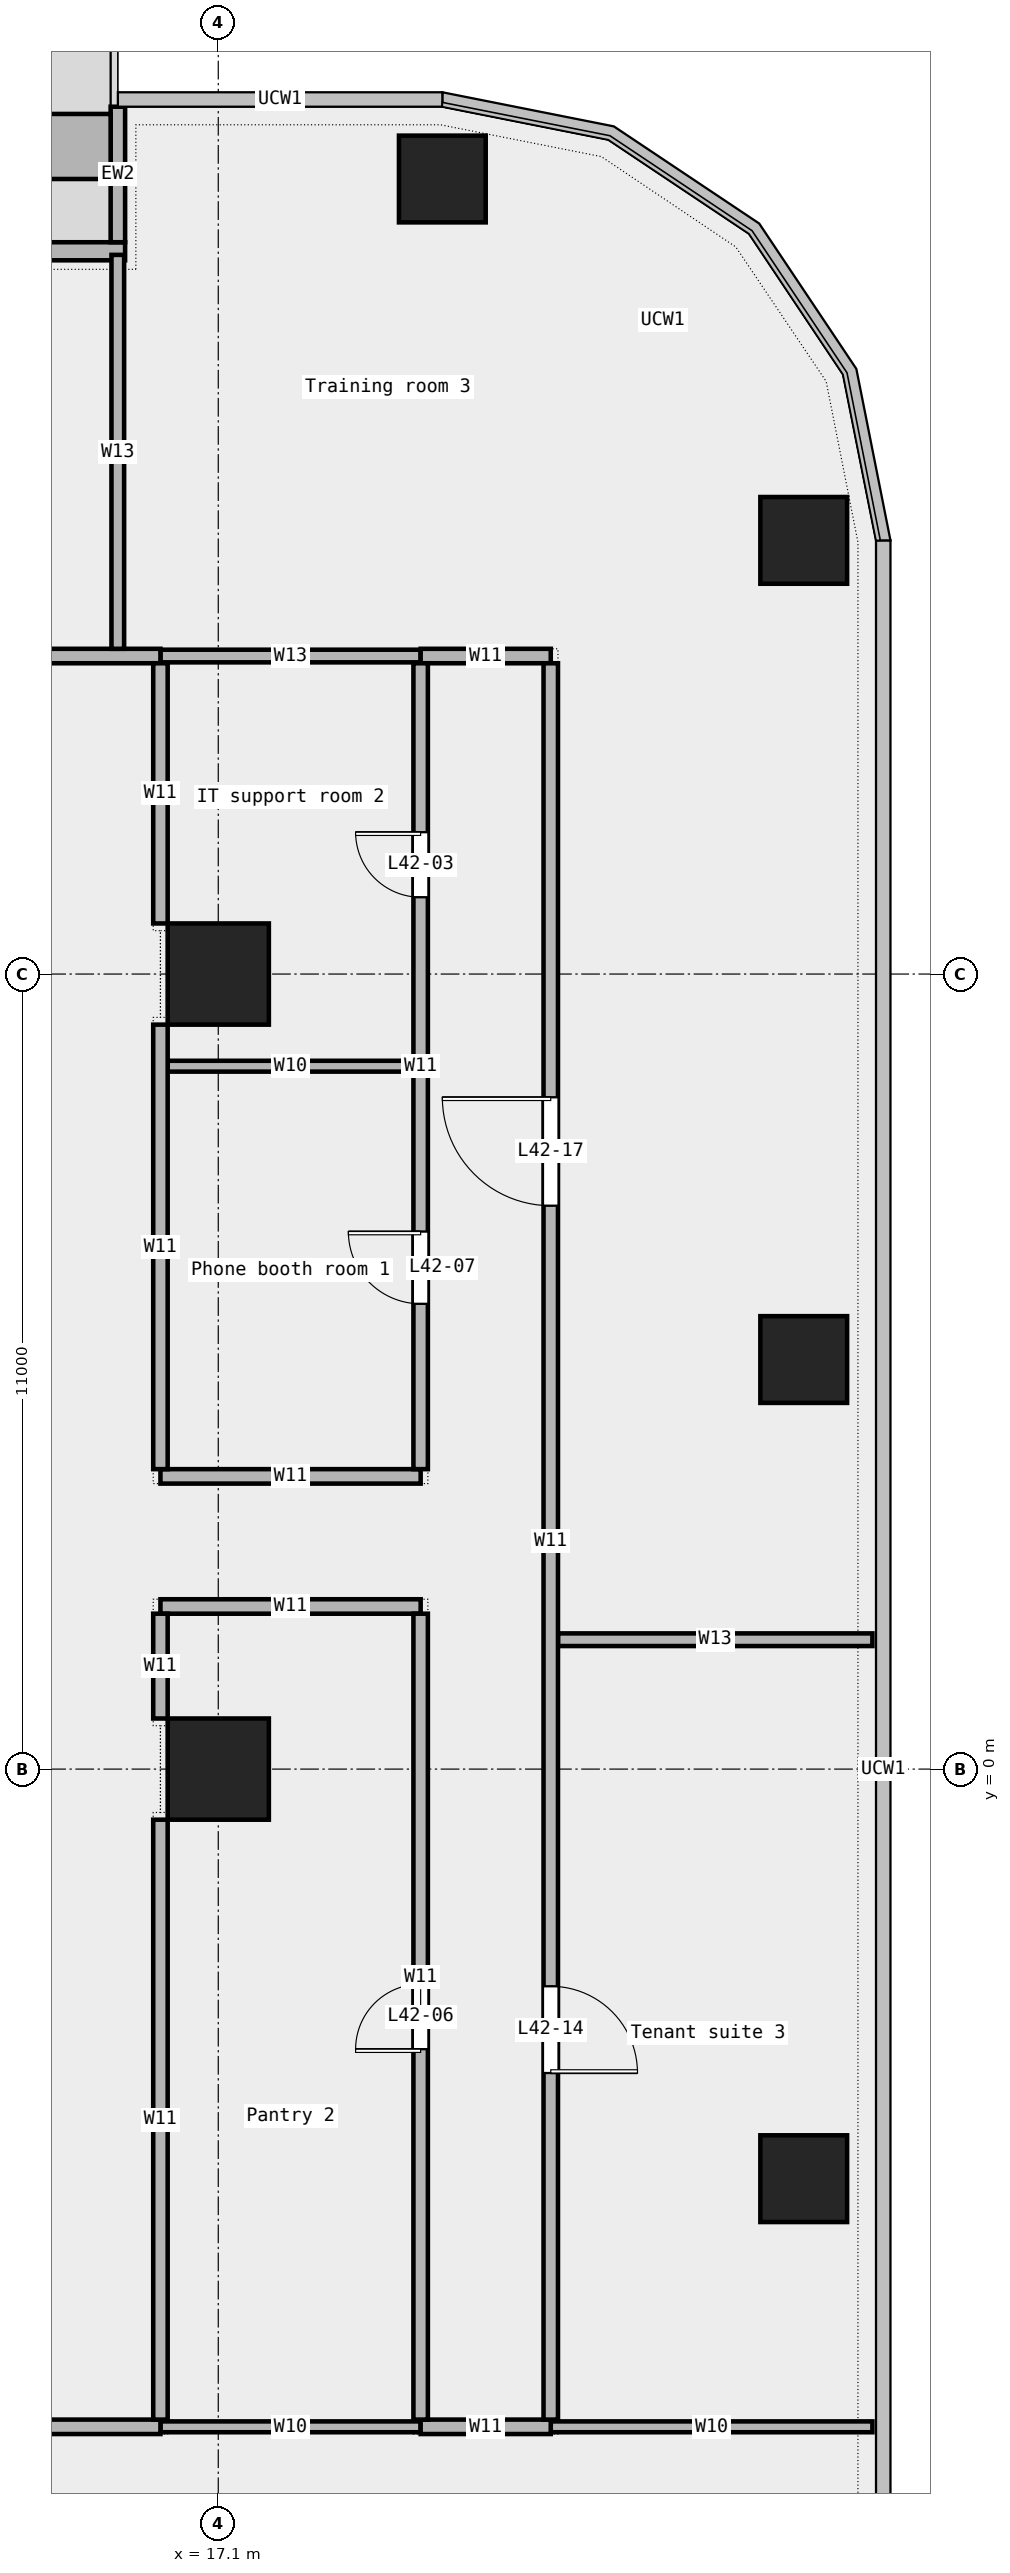
"""IFC4 building model, lengths in metres.
Left out: names, types, materials, properties, quantities, classifications, styles, units other than length and angle.
Written with IfcOpenShell. Run it as: python <this file> out.ifc"""

import sys

from ifc_helpers import new_model, si_unit, direction, frame, frame_2d, origin, origin_2d, place, context, subcontext, project, spatial, rectangle, extrude, element, fill, save


model = new_model("IFC4")
c1 = context("Model", 3, precision=1e-05, world=origin(), true_north=direction((0.0, 1.0)))
c2 = subcontext(c1, "Body", "Model", "MODEL_VIEW")
j1 = project(units=[si_unit("LENGTHUNIT", "METRE"), si_unit("PLANEANGLEUNIT", "RADIAN")], contexts=[c1])
p1 = place(None, origin())
s1 = spatial("IfcSite", under=j1, at=p1, CompositionType="ELEMENT")
p2 = place(p1, origin())
s2 = spatial("IfcBuilding", under=s1, at=p2, CompositionType="ELEMENT")
p3 = place(p2, frame((0.0, 0.0, 201.0)))
s3 = spatial("IfcBuildingStorey", under=s2, at=p3, CompositionType="ELEMENT", Elevation=201.0)
for number, where, z_axis, x_axis in (
    (1, (25.2, -5.667, 0.0), (0.0, 0.0, 1.0), (1.0, 0.0, 0.0)),
    (2, (25.2, 5.667, 0.0), (0.0, 0.0, 1.0), (1.0, 0.0, 0.0)),
    (3, (25.2, 17.0, 0.0), (0.0, 0.0, 1.0), (1.0, 0.0, 0.0)),
    (4, (20.2, 22.0, 0.0), (0.0, 0.0, 1.0), (1.0, 0.0, 0.0)),
):
    element("IfcColumn", number, at=place(p3, frame(where, z_axis=z_axis, x_axis=x_axis)), inside=s3, PredefinedType="COLUMN", context=c2, shape_type="SweptSolid", body=[
        extrude(rectangle(XDim=1.2, YDim=1.2, at=origin_2d()), origin(), (0.0, 0.0, 1.0), 3.4),
    ])
for number, where, z_axis, x_axis in (
    (5, (17.1, 0.0, 0.0), (0.0, 0.0, 1.0), (1.0, 0.0, 0.0)),
    (6, (17.1, 11.0, 0.0), (0.0, 0.0, 1.0), (1.0, 0.0, 0.0)),
):
    element("IfcColumn", number, at=place(p3, frame(where, z_axis=z_axis, x_axis=x_axis)), inside=s3, PredefinedType="COLUMN", context=c2, shape_type="SweptSolid", body=[
        extrude(rectangle(XDim=1.4, YDim=1.4, at=origin_2d()), origin(), (0.0, 0.0, 1.0), 3.4),
    ])
p4 = place(p3, frame((15.811, 21.0, 0.0), z_axis=(0.0, 0.0, 1.0), x_axis=(-1.0, 0.0, 0.0)))
e7 = element("IfcWall", 7, at=p4, inside=s3, PredefinedType="STANDARD", context=c2, shape_type="SweptSolid", body=[
    extrude(rectangle(XDim=13.667, YDim=0.25, at=frame_2d((6.833, 0.0))), origin(), (0.0, 0.0, 1.0), 3.4),
])
p5 = place(p4, frame((1.75, 0.0, 0.45)))
e8 = element("IfcOpeningElement", 8, at=p5, cuts=e7, PredefinedType="OPENING", context=c2, shape_type="SweptSolid", body=[
    extrude(rectangle(XDim=1.5, YDim=2.4, at=frame_2d((0.75, 1.2))), frame((0.0, 0.137, 0.0), z_axis=(0.0, -1.0, 0.0), x_axis=(1.0, 0.0, 0.0)), (0.0, 0.0, 1.0), 0.274),
])
p6 = place(p4, frame((6.75, 0.0, 0.0)))
e9 = element("IfcOpeningElement", 9, at=p6, cuts=e7, PredefinedType="OPENING", context=c2, shape_type="SweptSolid", body=[
    extrude(rectangle(XDim=1.8, YDim=2.4, at=frame_2d((0.9, 1.2))), frame((0.0, 0.137, 0.0), z_axis=(0.0, -1.0, 0.0), x_axis=(1.0, 0.0, 0.0)), (0.0, 0.0, 1.0), 0.274),
])
p7 = place(p4, frame((10.5, 0.0, 0.45)))
e10 = element("IfcOpeningElement", 10, at=p7, cuts=e7, PredefinedType="OPENING", context=c2, shape_type="SweptSolid", body=[
    extrude(rectangle(XDim=1.5, YDim=2.4, at=frame_2d((0.75, 1.2))), frame((0.0, 0.137, 0.0), z_axis=(0.0, -1.0, 0.0), x_axis=(1.0, 0.0, 0.0)), (0.0, 0.0, 1.0), 0.274),
])
p8 = place(p3, frame((15.711, 23.0, 0.0), z_axis=(0.0, 0.0, 1.0), x_axis=(0.0, -1.0, 0.0)))
e11 = element("IfcWall", 11, at=p8, inside=s3, PredefinedType="STANDARD", context=c2, shape_type="SweptSolid", body=[
    extrude(rectangle(XDim=1.875, YDim=0.2, at=frame_2d((0.938, 0.0))), origin(), (0.0, 0.0, 1.0), 3.4),
])
p9 = place(p3, frame((15.611, 22.45, 0.0), z_axis=(0.0, 0.0, 1.0), x_axis=(-1.0, 0.0, 0.0)))
e12 = element("IfcWall", 12, at=p9, inside=s3, PredefinedType="STANDARD", context=c2, shape_type="SweptSolid", body=[
    extrude(rectangle(XDim=3.6, YDim=0.9, at=frame_2d((1.8, 0.0))), origin(), (0.0, 0.0, 1.0), 0.7),
])
p10 = place(p3, frame((16.3, -9.1, 0.0), z_axis=(0.0, 0.0, 1.0), x_axis=(1.0, 0.0, 0.0)))
e13 = element("IfcWall", 13, at=p10, inside=s3, PredefinedType="PARTITIONING", context=c2, shape_type="SweptSolid", body=[
    extrude(rectangle(XDim=3.6, YDim=0.15, at=frame_2d((1.8, 0.0))), origin(), (0.0, 0.0, 1.0), 3.4),
])
p11 = place(p3, frame((21.7, -9.1, 0.0), z_axis=(0.0, 0.0, 1.0), x_axis=(1.0, 0.0, 0.0)))
e14 = element("IfcWall", 14, at=p11, inside=s3, PredefinedType="PARTITIONING", context=c2, shape_type="SweptSolid", body=[
    extrude(rectangle(XDim=4.45, YDim=0.15, at=frame_2d((2.225, 0.0))), origin(), (0.0, 0.0, 1.0), 3.4),
])
p12 = place(p3, frame((4.84, -9.1, 0.0), z_axis=(0.0, 0.0, 1.0), x_axis=(1.0, 0.0, 0.0)))
e15 = element("IfcWall", 15, at=p12, inside=s3, PredefinedType="PARTITIONING", context=c2, shape_type="SweptSolid", body=[
    extrude(rectangle(XDim=11.46, YDim=0.2, at=frame_2d((5.73, 0.0))), origin(), (0.0, 0.0, 1.0), 3.4),
])
p13 = place(p3, frame((19.9, -9.1, 0.0), z_axis=(0.0, 0.0, 1.0), x_axis=(1.0, 0.0, 0.0)))
e16 = element("IfcWall", 16, at=p13, inside=s3, PredefinedType="PARTITIONING", context=c2, shape_type="SweptSolid", body=[
    extrude(rectangle(XDim=1.8, YDim=0.2, at=frame_2d((0.9, 0.0))), origin(), (0.0, 0.0, 1.0), 3.4),
])
p14 = place(p3, frame((21.8, 1.79, 0.0), z_axis=(0.0, 0.0, 1.0), x_axis=(1.0, 0.0, 0.0)))
e17 = element("IfcWall", 17, at=p14, inside=s3, PredefinedType="PARTITIONING", context=c2, shape_type="SweptSolid", body=[
    extrude(rectangle(XDim=4.35, YDim=0.175, at=frame_2d((2.175, 0.0))), origin(), (0.0, 0.0, 1.0), 3.4),
])
for number, where, z_axis, x_axis in (
    (18, (16.3, 2.25, 0.0), (0.0, 0.0, 1.0), (1.0, 0.0, 0.0)),
    (19, (16.3, 4.05, 0.0), (0.0, 0.0, 1.0), (1.0, 0.0, 0.0)),
):
    element("IfcWall", number, at=place(p3, frame(where, z_axis=z_axis, x_axis=x_axis)), inside=s3, PredefinedType="PARTITIONING", context=c2, shape_type="SweptSolid", body=[
        extrude(rectangle(XDim=3.6, YDim=0.2, at=frame_2d((1.8, 0.0))), origin(), (0.0, 0.0, 1.0), 3.4),
    ])
p15 = place(p3, frame((16.4, 9.725, 0.0), z_axis=(0.0, 0.0, 1.0), x_axis=(1.0, 0.0, 0.0)))
e20 = element("IfcWall", 20, at=p15, inside=s3, PredefinedType="PARTITIONING", context=c2, shape_type="SweptSolid", body=[
    extrude(rectangle(XDim=3.4, YDim=0.15, at=frame_2d((1.7, 0.0))), origin(), (0.0, 0.0, 1.0), 3.4),
])
p16 = place(p3, frame((16.3, 15.4, 0.0), z_axis=(0.0, 0.0, 1.0), x_axis=(1.0, 0.0, 0.0)))
e21 = element("IfcWall", 21, at=p16, inside=s3, PredefinedType="PARTITIONING", context=c2, shape_type="SweptSolid", body=[
    extrude(rectangle(XDim=3.6, YDim=0.175, at=frame_2d((1.8, 0.0))), origin(), (0.0, 0.0, 1.0), 3.4),
])
p17 = place(p3, frame((-16.3, 15.4, 0.0), z_axis=(0.0, 0.0, 1.0), x_axis=(1.0, 0.0, 0.0)))
e22 = element("IfcWall", 22, at=p17, inside=s3, PredefinedType="PARTITIONING", context=c2, shape_type="SweptSolid", body=[
    extrude(rectangle(XDim=32.6, YDim=0.2, at=frame_2d((16.3, 0.0))), origin(), (0.0, 0.0, 1.0), 3.4),
])
p18 = place(p17, frame((10.185, 0.0, 0.0)))
e23 = element("IfcOpeningElement", 23, at=p18, cuts=e22, PredefinedType="OPENING", context=c2, shape_type="SweptSolid", body=[
    extrude(rectangle(XDim=1.5, YDim=2.1, at=frame_2d((0.75, 1.05))), frame((0.0, 0.112, 0.0), z_axis=(0.0, -1.0, 0.0), x_axis=(1.0, 0.0, 0.0)), (0.0, 0.0, 1.0), 0.224),
])
p19 = place(p17, frame((1.062, 0.0, 0.0)))
e24 = element("IfcOpeningElement", 24, at=p19, cuts=e22, PredefinedType="OPENING", context=c2, shape_type="SweptSolid", body=[
    extrude(rectangle(XDim=1.2, YDim=2.1, at=frame_2d((0.6, 1.05))), frame((0.0, 0.112, 0.0), z_axis=(0.0, -1.0, 0.0), x_axis=(1.0, 0.0, 0.0)), (0.0, 0.0, 1.0), 0.224),
])
p20 = place(p17, frame((24.677, 0.0, 0.0)))
e25 = element("IfcOpeningElement", 25, at=p20, cuts=e22, PredefinedType="OPENING", context=c2, shape_type="SweptSolid", body=[
    extrude(rectangle(XDim=1.2, YDim=2.1, at=frame_2d((0.6, 1.05))), frame((0.0, 0.112, 0.0), z_axis=(0.0, -1.0, 0.0), x_axis=(1.0, 0.0, 0.0)), (0.0, 0.0, 1.0), 0.224),
])
p21 = place(p3, frame((19.9, 15.4, 0.0), z_axis=(0.0, 0.0, 1.0), x_axis=(1.0, 0.0, 0.0)))
e26 = element("IfcWall", 26, at=p21, inside=s3, PredefinedType="PARTITIONING", context=c2, shape_type="SweptSolid", body=[
    extrude(rectangle(XDim=1.8, YDim=0.2, at=frame_2d((0.9, 0.0))), origin(), (0.0, 0.0, 1.0), 3.4),
])
p22 = place(p3, frame((15.71, 15.5, 0.0), z_axis=(0.0, 0.0, 1.0), x_axis=(0.0, 1.0, 0.0)))
e27 = element("IfcWall", 27, at=p22, inside=s3, PredefinedType="PARTITIONING", context=c2, shape_type="SweptSolid", body=[
    extrude(rectangle(XDim=5.45, YDim=0.175, at=frame_2d((2.725, 0.0))), origin(), (0.0, 0.0, 1.0), 3.4),
])
p23 = place(p3, frame((16.3, -9.0, 0.0), z_axis=(0.0, 0.0, 1.0), x_axis=(0.0, 1.0, 0.0)))
e28 = element("IfcWall", 28, at=p23, inside=s3, PredefinedType="PARTITIONING", context=c2, shape_type="SweptSolid", body=[
    extrude(rectangle(XDim=8.3, YDim=0.2, at=frame_2d((4.15, 0.0))), origin(), (0.0, 0.0, 1.0), 3.4),
])
p24 = place(p3, frame((16.3, 0.7, 0.0), z_axis=(0.0, 0.0, 1.0), x_axis=(0.0, 1.0, 0.0)))
e29 = element("IfcWall", 29, at=p24, inside=s3, PredefinedType="PARTITIONING", context=c2, shape_type="SweptSolid", body=[
    extrude(rectangle(XDim=1.45, YDim=0.2, at=frame_2d((0.725, 0.0))), origin(), (0.0, 0.0, 1.0), 3.4),
])
p25 = place(p3, frame((16.3, 4.15, 0.0), z_axis=(0.0, 0.0, 1.0), x_axis=(0.0, 1.0, 0.0)))
e30 = element("IfcWall", 30, at=p25, inside=s3, PredefinedType="PARTITIONING", context=c2, shape_type="SweptSolid", body=[
    extrude(rectangle(XDim=6.15, YDim=0.2, at=frame_2d((3.075, 0.0))), origin(), (0.0, 0.0, 1.0), 3.4),
])
p26 = place(p3, frame((16.3, 11.7, 0.0), z_axis=(0.0, 0.0, 1.0), x_axis=(0.0, 1.0, 0.0)))
e31 = element("IfcWall", 31, at=p26, inside=s3, PredefinedType="PARTITIONING", context=c2, shape_type="SweptSolid", body=[
    extrude(rectangle(XDim=3.6, YDim=0.2, at=frame_2d((1.8, 0.0))), origin(), (0.0, 0.0, 1.0), 3.4),
])
p27 = place(p3, frame((19.9, -9.0, 0.0), z_axis=(0.0, 0.0, 1.0), x_axis=(0.0, 1.0, 0.0)))
e32 = element("IfcWall", 32, at=p27, inside=s3, PredefinedType="PARTITIONING", context=c2, shape_type="SweptSolid", body=[
    extrude(rectangle(XDim=11.15, YDim=0.2, at=frame_2d((5.575, 0.0))), origin(), (0.0, 0.0, 1.0), 3.4),
])
p28 = place(p27, frame((5.125, 0.0, 0.0)))
e33 = element("IfcOpeningElement", 33, at=p28, cuts=e32, PredefinedType="OPENING", context=c2, shape_type="SweptSolid", body=[
    extrude(rectangle(XDim=0.9, YDim=2.1, at=frame_2d((0.45, 1.05))), frame((0.0, 0.112, 0.0), z_axis=(0.0, -1.0, 0.0), x_axis=(1.0, 0.0, 0.0)), (0.0, 0.0, 1.0), 0.224),
])
p29 = place(p3, frame((19.9, 4.15, 0.0), z_axis=(0.0, 0.0, 1.0), x_axis=(0.0, 1.0, 0.0)))
e34 = element("IfcWall", 34, at=p29, inside=s3, PredefinedType="PARTITIONING", context=c2, shape_type="SweptSolid", body=[
    extrude(rectangle(XDim=11.15, YDim=0.2, at=frame_2d((5.575, 0.0))), origin(), (0.0, 0.0, 1.0), 3.4),
])
p30 = place(p29, frame((7.913, 0.0, 0.0)))
e35 = element("IfcOpeningElement", 35, at=p30, cuts=e34, PredefinedType="OPENING", context=c2, shape_type="SweptSolid", body=[
    extrude(rectangle(XDim=0.9, YDim=2.1, at=frame_2d((0.45, 1.05))), frame((0.0, 0.112, 0.0), z_axis=(0.0, -1.0, 0.0), x_axis=(1.0, 0.0, 0.0)), (0.0, 0.0, 1.0), 0.224),
])
p31 = place(p29, frame((2.288, 0.0, 0.0)))
e36 = element("IfcOpeningElement", 36, at=p31, cuts=e34, PredefinedType="OPENING", context=c2, shape_type="SweptSolid", body=[
    extrude(rectangle(XDim=1.0, YDim=2.1, at=frame_2d((0.5, 1.05))), frame((0.0, 0.112, 0.0), z_axis=(0.0, -1.0, 0.0), x_axis=(1.0, 0.0, 0.0)), (0.0, 0.0, 1.0), 0.224),
])
p32 = place(p3, frame((21.7, -9.0, 0.0), z_axis=(0.0, 0.0, 1.0), x_axis=(0.0, 1.0, 0.0)))
e37 = element("IfcWall", 37, at=p32, inside=s3, PredefinedType="PARTITIONING", context=c2, shape_type="SweptSolid", body=[
    extrude(rectangle(XDim=24.3, YDim=0.2, at=frame_2d((12.15, 0.0))), origin(), (0.0, 0.0, 1.0), 3.4),
])
p33 = place(p32, frame((4.795, 0.0, 0.0)))
e38 = element("IfcOpeningElement", 38, at=p33, cuts=e37, PredefinedType="OPENING", context=c2, shape_type="SweptSolid", body=[
    extrude(rectangle(XDim=1.2, YDim=2.1, at=frame_2d((0.6, 1.05))), frame((0.0, 0.112, 0.0), z_axis=(0.0, -1.0, 0.0), x_axis=(1.0, 0.0, 0.0)), (0.0, 0.0, 1.0), 0.224),
])
p34 = place(p32, frame((16.795, 0.0, 0.0)))
e39 = element("IfcOpeningElement", 39, at=p34, cuts=e37, PredefinedType="OPENING", context=c2, shape_type="SweptSolid", body=[
    extrude(rectangle(XDim=1.5, YDim=2.1, at=frame_2d((0.75, 1.05))), frame((0.0, 0.112, 0.0), z_axis=(0.0, -1.0, 0.0), x_axis=(1.0, 0.0, 0.0)), (0.0, 0.0, 1.0), 0.224),
])
p35 = place(p30, origin())
e40 = element("IfcDoor", 40, at=p35, inside=s3, OperationType="SINGLE_SWING_RIGHT", PredefinedType="DOOR", context=c2, shape_type="SweptSolid", body=[
    extrude(rectangle(XDim=0.9, YDim=2.1, at=frame_2d((0.45, 1.05))), frame((0.0, 0.025, 0.0), z_axis=(0.0, -1.0, 0.0), x_axis=(1.0, 0.0, 0.0)), (0.0, 0.0, 1.0), 0.05),
])
fill(e35, e40)
p36 = place(p28, origin())
e41 = element("IfcDoor", 41, at=p36, inside=s3, OperationType="SINGLE_SWING_LEFT", PredefinedType="DOOR", context=c2, shape_type="SweptSolid", body=[
    extrude(rectangle(XDim=0.9, YDim=2.1, at=frame_2d((0.45, 1.05))), frame((0.0, 0.025, 0.0), z_axis=(0.0, -1.0, 0.0), x_axis=(1.0, 0.0, 0.0)), (0.0, 0.0, 1.0), 0.05),
])
fill(e33, e41)
p37 = place(p31, origin())
e42 = element("IfcDoor", 42, at=p37, inside=s3, OperationType="SINGLE_SWING_RIGHT", PredefinedType="DOOR", context=c2, shape_type="SweptSolid", body=[
    extrude(rectangle(XDim=1.0, YDim=2.1, at=frame_2d((0.5, 1.05))), frame((0.0, 0.025, 0.0), z_axis=(0.0, -1.0, 0.0), x_axis=(1.0, 0.0, 0.0)), (0.0, 0.0, 1.0), 0.05),
])
fill(e36, e42)
p38 = place(p33, origin())
e43 = element("IfcDoor", 43, at=p38, inside=s3, OperationType="SINGLE_SWING_RIGHT", PredefinedType="DOOR", context=c2, shape_type="SweptSolid", body=[
    extrude(rectangle(XDim=1.2, YDim=2.1, at=frame_2d((0.6, 1.05))), frame((0.0, 0.025, 0.0), z_axis=(0.0, -1.0, 0.0), x_axis=(1.0, 0.0, 0.0)), (0.0, 0.0, 1.0), 0.05),
])
fill(e38, e43)
p39 = place(p34, origin())
e44 = element("IfcDoor", 44, at=p39, inside=s3, OperationType="DOUBLE_DOOR_SINGLE_SWING", PredefinedType="DOOR", context=c2, shape_type="SweptSolid", body=[
    extrude(rectangle(XDim=1.5, YDim=2.1, at=frame_2d((0.75, 1.05))), frame((0.0, 0.025, 0.0), z_axis=(0.0, -1.0, 0.0), x_axis=(1.0, 0.0, 0.0)), (0.0, 0.0, 1.0), 0.05),
])
fill(e39, e44)
save(model, sys.argv[1])
